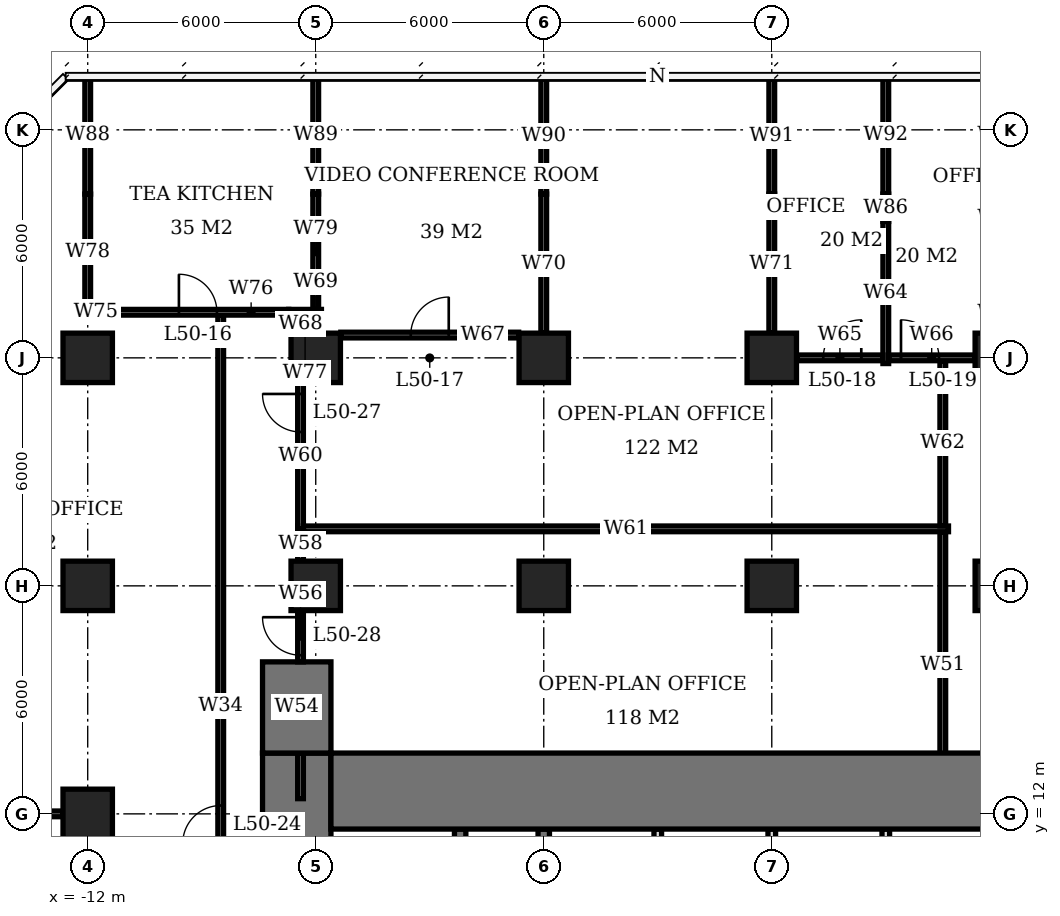
"""IFC4 building model, lengths in metres.
Left out: names, types, materials, properties, quantities, classifications, styles, units other than length and angle.
Written with IfcOpenShell. Run it as: python <this file> out.ifc"""

import sys

from ifc_helpers import new_model, si_unit, direction, frame, frame_2d, origin, origin_2d, place, context, subcontext, project, spatial, rectangle, extrude, element, fill, save


model = new_model("IFC4")
c1 = context("Model", 3, precision=1e-05, world=origin(), true_north=direction((0.0, 1.0)))
c2 = subcontext(c1, "Body", "Model", "MODEL_VIEW")
j1 = project(units=[si_unit("LENGTHUNIT", "METRE"), si_unit("PLANEANGLEUNIT", "RADIAN")], contexts=[c1])
p1 = place(None, origin())
s1 = spatial("IfcSite", under=j1, at=p1, CompositionType="ELEMENT")
p2 = place(p1, origin())
s2 = spatial("IfcBuilding", under=s1, at=p2, CompositionType="ELEMENT")
p3 = place(p2, frame((0.0, 0.0, 204.5)))
s3 = spatial("IfcBuildingStorey", under=s2, at=p3, CompositionType="ELEMENT", Elevation=204.5)
for number, where, z_axis, x_axis in (
    (1, (-12.0, 12.0, 0.0), (0.0, 0.0, 1.0), (1.0, 0.0, 0.0)),
    (2, (-12.0, 18.0, 0.0), (0.0, 0.0, 1.0), (1.0, 0.0, 0.0)),
    (3, (-12.0, 24.0, 0.0), (0.0, 0.0, 1.0), (1.0, 0.0, 0.0)),
    (4, (-6.0, 18.0, 0.0), (0.0, 0.0, 1.0), (1.0, 0.0, 0.0)),
    (5, (-6.0, 24.0, 0.0), (0.0, 0.0, 1.0), (1.0, 0.0, 0.0)),
    (6, (0.0, 18.0, 0.0), (0.0, 0.0, 1.0), (1.0, 0.0, 0.0)),
    (7, (0.0, 24.0, 0.0), (0.0, 0.0, 1.0), (1.0, 0.0, 0.0)),
    (8, (6.0, 18.0, 0.0), (0.0, 0.0, 1.0), (1.0, 0.0, 0.0)),
    (9, (6.0, 24.0, 0.0), (0.0, 0.0, 1.0), (1.0, 0.0, 0.0)),
    (10, (12.0, 18.0, 0.0), (0.0, 0.0, 1.0), (1.0, 0.0, 0.0)),
    (11, (12.0, 24.0, 0.0), (0.0, 0.0, 1.0), (1.0, 0.0, 0.0)),
):
    element("IfcColumn", number, at=place(p3, frame(where, z_axis=z_axis, x_axis=x_axis)), inside=s3, PredefinedType="COLUMN", context=c2, shape_type="SweptSolid", body=[
        extrude(rectangle(XDim=1.3, YDim=1.3, at=origin_2d()), origin(), (0.0, 0.0, 1.0), 3.9),
    ])
p4 = place(p3, frame((-5.6, 12.6, 0.0), z_axis=(0.0, 0.0, 1.0), x_axis=(1.0, 0.0, 0.0)))
e12 = element("IfcWall", 12, at=p4, inside=s3, PredefinedType="SHEAR", context=c2, shape_type="SweptSolid", body=[
    extrude(rectangle(XDim=23.2, YDim=2.0, at=frame_2d((11.6, 0.0))), origin(), (0.0, 0.0, 1.0), 3.9),
])
p5 = place(p3, frame((-6.5, -7.6, 0.0), z_axis=(0.0, 0.0, 1.0), x_axis=(0.0, 1.0, 0.0)))
e13 = element("IfcWall", 13, at=p5, inside=s3, PredefinedType="SHEAR", context=c2, shape_type="SweptSolid", body=[
    extrude(rectangle(XDim=21.2, YDim=1.8, at=frame_2d((10.6, 0.0))), origin(), (0.0, 0.0, 1.0), 3.9),
])
p6 = place(p5, frame((7.8, 0.0, 0.0)))
e14 = element("IfcOpeningElement", 14, at=p6, cuts=e13, PredefinedType="OPENING", context=c2, shape_type="SweptSolid", body=[
    extrude(rectangle(XDim=1.8, YDim=2.4, at=frame_2d((0.9, 1.2))), frame((0.0, 0.91, 0.0), z_axis=(0.0, -1.0, 0.0), x_axis=(1.0, 0.0, 0.0)), (0.0, 0.0, 1.0), 1.82),
])
p7 = place(p3, frame((-6.5, 13.6, 0.0), z_axis=(0.0, 0.0, 1.0), x_axis=(0.0, 1.0, 0.0)))
e15 = element("IfcWall", 15, at=p7, inside=s3, PredefinedType="SHEAR", context=c2, shape_type="SweptSolid", body=[
    extrude(rectangle(XDim=2.4, YDim=1.8, at=frame_2d((1.2, 0.0))), origin(), (0.0, 0.0, 1.0), 3.9),
])
for number, where, z_axis, x_axis in (
    (16, (0.0, 3.15, 0.0), (0.0, 0.0, 1.0), (0.0, 1.0, 0.0)),
    (17, (-2.2, 3.15, 0.0), (0.0, 0.0, 1.0), (0.0, 1.0, 0.0)),
):
    element("IfcWall", number, at=place(p3, frame(where, z_axis=z_axis, x_axis=x_axis)), inside=s3, PredefinedType="SHEAR", context=c2, shape_type="SweptSolid", body=[
        extrude(rectangle(XDim=8.45, YDim=0.3, at=frame_2d((4.225, 0.0))), origin(), (0.0, 0.0, 1.0), 3.9),
    ])
for number, where, z_axis, x_axis in (
    (18, (3.0, 6.15, 0.0), (0.0, 0.0, 1.0), (0.0, 1.0, 0.0)),
    (19, (6.0, 6.15, 0.0), (0.0, 0.0, 1.0), (0.0, 1.0, 0.0)),
    (20, (9.0, 6.15, 0.0), (0.0, 0.0, 1.0), (0.0, 1.0, 0.0)),
):
    element("IfcWall", number, at=place(p3, frame(where, z_axis=z_axis, x_axis=x_axis)), inside=s3, PredefinedType="SOLIDWALL", context=c2, shape_type="SweptSolid", body=[
        extrude(rectangle(XDim=5.45, YDim=0.2, at=frame_2d((2.725, 0.0))), origin(), (0.0, 0.0, 1.0), 3.9),
    ])
p8 = place(p3, frame((-16.31, 12.0, 0.0), z_axis=(0.0, 0.0, 1.0), x_axis=(1.0, 0.0, 0.0)))
e21 = element("IfcWall", 21, at=p8, inside=s3, PredefinedType="PARTITIONING", context=c2, shape_type="SweptSolid", body=[
    extrude(rectangle(XDim=3.66, YDim=0.15, at=frame_2d((1.83, 0.0))), origin(), (0.0, 0.0, 1.0), 2.65),
])
p9 = place(p3, frame((6.66, 24.0, 0.0), z_axis=(0.0, 0.0, 1.0), x_axis=(1.0, 0.0, 0.0)))
e22 = element("IfcWall", 22, at=p9, inside=s3, PredefinedType="PARTITIONING", context=c2, shape_type="SweptSolid", body=[
    extrude(rectangle(XDim=2.265, YDim=0.15, at=frame_2d((1.133, 0.0))), origin(), (0.0, 0.0, 1.0), 3.65),
])
p10 = place(p9, frame((0.695, 0.0, 0.0)))
e23 = element("IfcOpeningElement", 23, at=p10, cuts=e22, PredefinedType="OPENING", context=c2, shape_type="SweptSolid", body=[
    extrude(rectangle(XDim=1.0, YDim=2.1, at=frame_2d((0.5, 1.05))), frame((0.0, 0.085, 0.0), z_axis=(0.0, -1.0, 0.0), x_axis=(1.0, 0.0, 0.0)), (0.0, 0.0, 1.0), 0.17),
])
p11 = place(p3, frame((9.075, 24.0, 0.0), z_axis=(0.0, 0.0, 1.0), x_axis=(1.0, 0.0, 0.0)))
e24 = element("IfcWall", 24, at=p11, inside=s3, PredefinedType="PARTITIONING", context=c2, shape_type="SweptSolid", body=[
    extrude(rectangle(XDim=2.265, YDim=0.15, at=frame_2d((1.133, 0.0))), origin(), (0.0, 0.0, 1.0), 3.65),
])
p12 = place(p11, frame((0.325, 0.0, 0.0)))
e25 = element("IfcOpeningElement", 25, at=p12, cuts=e24, PredefinedType="OPENING", context=c2, shape_type="SweptSolid", body=[
    extrude(rectangle(XDim=1.0, YDim=2.1, at=frame_2d((0.5, 1.05))), frame((0.0, 0.085, 0.0), z_axis=(0.0, -1.0, 0.0), x_axis=(1.0, 0.0, 0.0)), (0.0, 0.0, 1.0), 0.17),
])
p13 = place(p3, frame((-5.34, 24.6, 0.0), z_axis=(0.0, 0.0, 1.0), x_axis=(1.0, 0.0, 0.0)))
e26 = element("IfcWall", 26, at=p13, inside=s3, PredefinedType="PARTITIONING", context=c2, shape_type="SweptSolid", body=[
    extrude(rectangle(XDim=4.68, YDim=0.15, at=frame_2d((2.34, 0.0))), origin(), (0.0, 0.0, 1.0), 3.65),
])
p14 = place(p13, frame((1.84, 0.0, 0.0)))
e27 = element("IfcOpeningElement", 27, at=p14, cuts=e26, PredefinedType="OPENING", context=c2, shape_type="SweptSolid", body=[
    extrude(rectangle(XDim=1.0, YDim=2.1, at=frame_2d((0.5, 1.05))), frame((0.0, 0.085, 0.0), z_axis=(0.0, -1.0, 0.0), x_axis=(1.0, 0.0, 0.0)), (0.0, 0.0, 1.0), 0.17),
])
p15 = place(p3, frame((-12.075, 25.2, 0.0), z_axis=(0.0, 0.0, 1.0), x_axis=(1.0, 0.0, 0.0)))
e28 = element("IfcWall", 28, at=p15, inside=s3, PredefinedType="PARTITIONING", context=c2, shape_type="SweptSolid", body=[
    extrude(rectangle(XDim=0.585, YDim=0.15, at=frame_2d((0.292, 0.0))), origin(), (0.0, 0.0, 1.0), 2.65),
])
p16 = place(p3, frame((-11.49, 25.2, 0.0), z_axis=(0.0, 0.0, 1.0), x_axis=(1.0, 0.0, 0.0)))
e29 = element("IfcWall", 29, at=p16, inside=s3, PredefinedType="PARTITIONING", context=c2, shape_type="SweptSolid", body=[
    extrude(rectangle(XDim=4.78, YDim=0.15, at=frame_2d((2.39, 0.0))), origin(), (0.0, 0.0, 1.0), 3.65),
])
p17 = place(p16, frame((1.89, 0.0, 0.0)))
e30 = element("IfcOpeningElement", 30, at=p17, cuts=e29, PredefinedType="OPENING", context=c2, shape_type="SweptSolid", body=[
    extrude(rectangle(XDim=1.0, YDim=2.1, at=frame_2d((0.5, 1.05))), frame((0.0, 0.085, 0.0), z_axis=(0.0, -1.0, 0.0), x_axis=(1.0, 0.0, 0.0)), (0.0, 0.0, 1.0), 0.17),
])
p18 = place(p3, frame((-6.71, 25.2, 0.0), z_axis=(0.0, 0.0, 1.0), x_axis=(1.0, 0.0, 0.0)))
e31 = element("IfcWall", 31, at=p18, inside=s3, PredefinedType="PARTITIONING", context=c2, shape_type="SweptSolid", body=[
    extrude(rectangle(XDim=0.86, YDim=0.15, at=frame_2d((0.43, 0.0))), origin(), (0.0, 0.0, 1.0), 2.65),
])
p19 = place(p3, frame((-12.0, 25.275, 0.0), z_axis=(0.0, 0.0, 1.0), x_axis=(0.0, 1.0, 0.0)))
e32 = element("IfcWall", 32, at=p19, inside=s3, PredefinedType="PARTITIONING", context=c2, shape_type="SweptSolid", body=[
    extrude(rectangle(XDim=3.035, YDim=0.15, at=frame_2d((1.518, 0.0))), origin(), (0.0, 0.0, 1.0), 2.65),
])
p20 = place(p3, frame((-12.0, 28.31, 0.0), z_axis=(0.0, 0.0, 1.0), x_axis=(0.0, 1.0, 0.0)))
e33 = element("IfcWall", 33, at=p20, inside=s3, PredefinedType="PARTITIONING", context=c2, shape_type="SweptSolid", body=[
    extrude(rectangle(XDim=3.09, YDim=0.15, at=frame_2d((1.545, 0.0))), origin(), (0.0, 0.0, 1.0), 3.65),
])
p21 = place(p3, frame((-6.0, 24.65, 0.0), z_axis=(0.0, 0.0, 1.0), x_axis=(0.0, 1.0, 0.0)))
e34 = element("IfcWall", 34, at=p21, inside=s3, PredefinedType="PARTITIONING", context=c2, shape_type="SweptSolid", body=[
    extrude(rectangle(XDim=0.475, YDim=0.15, at=frame_2d((0.238, 0.0))), origin(), (0.0, 0.0, 1.0), 2.65),
])
p22 = place(p3, frame((-6.0, 25.275, 0.0), z_axis=(0.0, 0.0, 1.0), x_axis=(0.0, 1.0, 0.0)))
e35 = element("IfcWall", 35, at=p22, inside=s3, PredefinedType="PARTITIONING", context=c2, shape_type="SweptSolid", body=[
    extrude(rectangle(XDim=3.035, YDim=0.15, at=frame_2d((1.518, 0.0))), origin(), (0.0, 0.0, 1.0), 2.65),
])
p23 = place(p3, frame((-6.0, 28.31, 0.0), z_axis=(0.0, 0.0, 1.0), x_axis=(0.0, 1.0, 0.0)))
e36 = element("IfcWall", 36, at=p23, inside=s3, PredefinedType="PARTITIONING", context=c2, shape_type="SweptSolid", body=[
    extrude(rectangle(XDim=3.09, YDim=0.15, at=frame_2d((1.545, 0.0))), origin(), (0.0, 0.0, 1.0), 3.65),
])
p24 = place(p3, frame((0.0, 24.65, 0.0), z_axis=(0.0, 0.0, 1.0), x_axis=(0.0, 1.0, 0.0)))
e37 = element("IfcWall", 37, at=p24, inside=s3, PredefinedType="PARTITIONING", context=c2, shape_type="SweptSolid", body=[
    extrude(rectangle(XDim=3.66, YDim=0.15, at=frame_2d((1.83, 0.0))), origin(), (0.0, 0.0, 1.0), 2.65),
])
p25 = place(p3, frame((0.0, 28.31, 0.0), z_axis=(0.0, 0.0, 1.0), x_axis=(0.0, 1.0, 0.0)))
e38 = element("IfcWall", 38, at=p25, inside=s3, PredefinedType="PARTITIONING", context=c2, shape_type="SweptSolid", body=[
    extrude(rectangle(XDim=3.04, YDim=0.15, at=frame_2d((1.52, 0.0))), origin(), (0.0, 0.0, 1.0), 3.65),
])
p26 = place(p3, frame((6.0, 24.65, 0.0), z_axis=(0.0, 0.0, 1.0), x_axis=(0.0, 1.0, 0.0)))
e39 = element("IfcWall", 39, at=p26, inside=s3, PredefinedType="PARTITIONING", context=c2, shape_type="SweptSolid", body=[
    extrude(rectangle(XDim=3.66, YDim=0.15, at=frame_2d((1.83, 0.0))), origin(), (0.0, 0.0, 1.0), 2.65),
])
p27 = place(p3, frame((6.0, 28.31, 0.0), z_axis=(0.0, 0.0, 1.0), x_axis=(0.0, 1.0, 0.0)))
e40 = element("IfcWall", 40, at=p27, inside=s3, PredefinedType="PARTITIONING", context=c2, shape_type="SweptSolid", body=[
    extrude(rectangle(XDim=3.04, YDim=0.15, at=frame_2d((1.52, 0.0))), origin(), (0.0, 0.0, 1.0), 3.65),
])
p28 = place(p3, frame((9.0, 23.85, 0.0), z_axis=(0.0, 0.0, 1.0), x_axis=(0.0, 1.0, 0.0)))
e41 = element("IfcWall", 41, at=p28, inside=s3, PredefinedType="PARTITIONING", context=c2, shape_type="SweptSolid", body=[
    extrude(rectangle(XDim=3.74, YDim=0.15, at=frame_2d((1.87, 0.0))), origin(), (0.0, 0.0, 1.0), 3.65),
])
p29 = place(p3, frame((9.0, 27.59, 0.0), z_axis=(0.0, 0.0, 1.0), x_axis=(0.0, 1.0, 0.0)))
e42 = element("IfcWall", 42, at=p29, inside=s3, PredefinedType="PARTITIONING", context=c2, shape_type="SweptSolid", body=[
    extrude(rectangle(XDim=0.72, YDim=0.15, at=frame_2d((0.36, 0.0))), origin(), (0.0, 0.0, 1.0), 2.65),
])
p30 = place(p3, frame((9.0, 28.31, 0.0), z_axis=(0.0, 0.0, 1.0), x_axis=(0.0, 1.0, 0.0)))
e43 = element("IfcWall", 43, at=p30, inside=s3, PredefinedType="PARTITIONING", context=c2, shape_type="SweptSolid", body=[
    extrude(rectangle(XDim=3.09, YDim=0.15, at=frame_2d((1.545, 0.0))), origin(), (0.0, 0.0, 1.0), 3.65),
])
p31 = place(p3, frame((-8.5, 4.575, 0.0), z_axis=(0.0, 0.0, 1.0), x_axis=(0.0, 1.0, 0.0)))
e44 = element("IfcWall", 44, at=p31, inside=s3, PredefinedType="PARTITIONING", context=c2, shape_type="SweptSolid", body=[
    extrude(rectangle(XDim=20.55, YDim=0.15, at=frame_2d((10.275, 0.0))), origin(), (0.0, 0.0, 1.0), 3.65),
])
p32 = place(p31, frame((6.644, 0.0, 0.0)))
e45 = element("IfcOpeningElement", 45, at=p32, cuts=e44, PredefinedType="OPENING", context=c2, shape_type="SweptSolid", body=[
    extrude(rectangle(XDim=1.0, YDim=2.1, at=frame_2d((0.5, 1.05))), frame((0.0, 0.085, 0.0), z_axis=(0.0, -1.0, 0.0), x_axis=(1.0, 0.0, 0.0)), (0.0, 0.0, 1.0), 0.17),
])
p33 = place(p3, frame((-6.4, 12.4, 0.0), z_axis=(0.0, 0.0, 1.0), x_axis=(0.0, 1.0, 0.0)))
e46 = element("IfcWall", 46, at=p33, inside=s3, PredefinedType="PARTITIONING", context=c2, shape_type="SweptSolid", body=[
    extrude(rectangle(XDim=1.2, YDim=0.15, at=frame_2d((0.6, 0.0))), origin(), (0.0, 0.0, 1.0), 3.65),
])
p34 = place(p3, frame((-6.4, 16.0, 0.0), z_axis=(0.0, 0.0, 1.0), x_axis=(0.0, 1.0, 0.0)))
e47 = element("IfcWall", 47, at=p34, inside=s3, PredefinedType="PARTITIONING", context=c2, shape_type="SweptSolid", body=[
    extrude(rectangle(XDim=1.35, YDim=0.15, at=frame_2d((0.675, 0.0))), origin(), (0.0, 0.0, 1.0), 3.65),
])
p35 = place(p34, frame((0.175, 0.0, 0.0)))
e48 = element("IfcOpeningElement", 48, at=p35, cuts=e47, PredefinedType="OPENING", context=c2, shape_type="SweptSolid", body=[
    extrude(rectangle(XDim=1.0, YDim=2.1, at=frame_2d((0.5, 1.05))), frame((0.0, 0.085, 0.0), z_axis=(0.0, -1.0, 0.0), x_axis=(1.0, 0.0, 0.0)), (0.0, 0.0, 1.0), 0.17),
])
p36 = place(p3, frame((-6.4, 18.65, 0.0), z_axis=(0.0, 0.0, 1.0), x_axis=(0.0, 1.0, 0.0)))
e49 = element("IfcWall", 49, at=p36, inside=s3, PredefinedType="PARTITIONING", context=c2, shape_type="SweptSolid", body=[
    extrude(rectangle(XDim=0.925, YDim=0.15, at=frame_2d((0.462, 0.0))), origin(), (0.0, 0.0, 1.0), 3.65),
])
p37 = place(p3, frame((-6.4, 19.5, 0.0), z_axis=(0.0, 0.0, 1.0), x_axis=(0.0, 1.0, 0.0)))
e50 = element("IfcWall", 50, at=p37, inside=s3, PredefinedType="PARTITIONING", context=c2, shape_type="SweptSolid", body=[
    extrude(rectangle(XDim=3.85, YDim=0.15, at=frame_2d((1.925, 0.0))), origin(), (0.0, 0.0, 1.0), 3.65),
])
p38 = place(p37, frame((2.55, 0.0, 0.0)))
e51 = element("IfcOpeningElement", 51, at=p38, cuts=e50, PredefinedType="OPENING", context=c2, shape_type="SweptSolid", body=[
    extrude(rectangle(XDim=1.0, YDim=2.1, at=frame_2d((0.5, 1.05))), frame((0.0, 0.085, 0.0), z_axis=(0.0, -1.0, 0.0), x_axis=(1.0, 0.0, 0.0)), (0.0, 0.0, 1.0), 0.17),
])
p39 = place(p3, frame((-6.4, 24.65, 0.0), z_axis=(0.0, 0.0, 1.0), x_axis=(0.0, 1.0, 0.0)))
e52 = element("IfcWall", 52, at=p39, inside=s3, PredefinedType="PARTITIONING", context=c2, shape_type="SweptSolid", body=[
    extrude(rectangle(XDim=0.475, YDim=0.15, at=frame_2d((0.238, 0.0))), origin(), (0.0, 0.0, 1.0), 2.65),
])
p40 = place(p3, frame((-6.325, 19.5, 0.0), z_axis=(0.0, 0.0, 1.0), x_axis=(1.0, 0.0, 0.0)))
e53 = element("IfcWall", 53, at=p40, inside=s3, PredefinedType="PARTITIONING", context=c2, shape_type="SweptSolid", body=[
    extrude(rectangle(XDim=16.975, YDim=0.15, at=frame_2d((8.487, 0.0))), origin(), (0.0, 0.0, 1.0), 3.65),
])
p41 = place(p3, frame((10.5, 12.4, 0.0), z_axis=(0.0, 0.0, 1.0), x_axis=(0.0, 1.0, 0.0)))
e54 = element("IfcWall", 54, at=p41, inside=s3, PredefinedType="PARTITIONING", context=c2, shape_type="SweptSolid", body=[
    extrude(rectangle(XDim=7.025, YDim=0.15, at=frame_2d((3.513, 0.0))), origin(), (0.0, 0.0, 1.0), 3.65),
])
p42 = place(p3, frame((10.5, 19.575, 0.0), z_axis=(0.0, 0.0, 1.0), x_axis=(0.0, 1.0, 0.0)))
e55 = element("IfcWall", 55, at=p42, inside=s3, PredefinedType="PARTITIONING", context=c2, shape_type="SweptSolid", body=[
    extrude(rectangle(XDim=4.35, YDim=0.15, at=frame_2d((2.175, 0.0))), origin(), (0.0, 0.0, 1.0), 3.65),
])
p43 = place(p17, origin())
e56 = element("IfcDoor", 56, at=p43, inside=s3, OperationType="SINGLE_SWING_LEFT", PredefinedType="DOOR", context=c2, shape_type="SweptSolid", body=[
    extrude(rectangle(XDim=1.0, YDim=2.1, at=frame_2d((0.5, 1.05))), frame((0.0, 0.025, 0.0), z_axis=(0.0, -1.0, 0.0), x_axis=(1.0, 0.0, 0.0)), (0.0, 0.0, 1.0), 0.05),
])
fill(e30, e56)
p44 = place(p14, origin())
e57 = element("IfcDoor", 57, at=p44, inside=s3, OperationType="SINGLE_SWING_RIGHT", PredefinedType="DOOR", context=c2, shape_type="SweptSolid", body=[
    extrude(rectangle(XDim=1.0, YDim=2.1, at=frame_2d((0.5, 1.05))), frame((0.0, 0.025, 0.0), z_axis=(0.0, -1.0, 0.0), x_axis=(1.0, 0.0, 0.0)), (0.0, 0.0, 1.0), 0.05),
])
fill(e27, e57)
p45 = place(p10, origin())
e58 = element("IfcDoor", 58, at=p45, inside=s3, OperationType="SINGLE_SWING_RIGHT", PredefinedType="DOOR", context=c2, shape_type="SweptSolid", body=[
    extrude(rectangle(XDim=1.0, YDim=2.1, at=frame_2d((0.5, 1.05))), frame((0.0, 0.025, 0.0), z_axis=(0.0, -1.0, 0.0), x_axis=(1.0, 0.0, 0.0)), (0.0, 0.0, 1.0), 0.05),
])
fill(e23, e58)
p46 = place(p12, origin())
e59 = element("IfcDoor", 59, at=p46, inside=s3, OperationType="SINGLE_SWING_LEFT", PredefinedType="DOOR", context=c2, shape_type="SweptSolid", body=[
    extrude(rectangle(XDim=1.0, YDim=2.1, at=frame_2d((0.5, 1.05))), frame((0.0, 0.025, 0.0), z_axis=(0.0, -1.0, 0.0), x_axis=(1.0, 0.0, 0.0)), (0.0, 0.0, 1.0), 0.05),
])
fill(e25, e59)
p47 = place(p32, origin())
e60 = element("IfcDoor", 60, at=p47, inside=s3, OperationType="SINGLE_SWING_LEFT", PredefinedType="DOOR", context=c2, shape_type="SweptSolid", body=[
    extrude(rectangle(XDim=1.0, YDim=2.1, at=frame_2d((0.5, 1.05))), frame((0.0, 0.025, 0.0), z_axis=(0.0, -1.0, 0.0), x_axis=(1.0, 0.0, 0.0)), (0.0, 0.0, 1.0), 0.05),
])
fill(e45, e60)
p48 = place(p38, origin())
e61 = element("IfcDoor", 61, at=p48, inside=s3, OperationType="SINGLE_SWING_RIGHT", PredefinedType="DOOR", context=c2, shape_type="SweptSolid", body=[
    extrude(rectangle(XDim=1.0, YDim=2.1, at=frame_2d((0.5, 1.05))), frame((0.0, 0.025, 0.0), z_axis=(0.0, -1.0, 0.0), x_axis=(1.0, 0.0, 0.0)), (0.0, 0.0, 1.0), 0.05),
])
fill(e51, e61)
p49 = place(p35, origin())
e62 = element("IfcDoor", 62, at=p49, inside=s3, OperationType="SINGLE_SWING_RIGHT", PredefinedType="DOOR", context=c2, shape_type="SweptSolid", body=[
    extrude(rectangle(XDim=1.0, YDim=2.1, at=frame_2d((0.5, 1.05))), frame((0.0, 0.025, 0.0), z_axis=(0.0, -1.0, 0.0), x_axis=(1.0, 0.0, 0.0)), (0.0, 0.0, 1.0), 0.05),
])
fill(e48, e62)
save(model, sys.argv[1])
